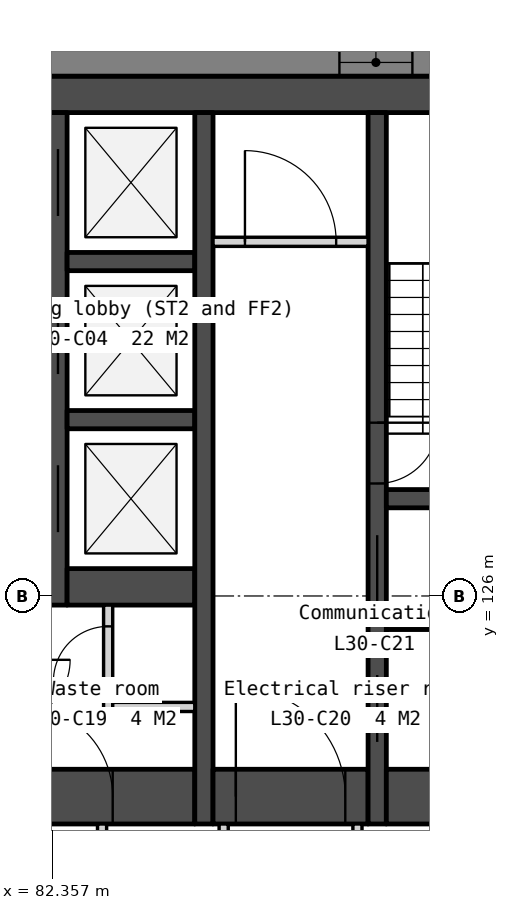
"""IFC4 building model, lengths in metres.
Left out: names, types, materials, properties, quantities, classifications, styles, units other than length and angle.
Written with IfcOpenShell. Run it as: python <this file> out.ifc"""

import sys

from ifc_helpers import new_model, si_unit, direction, frame, frame_2d, origin, place, context, subcontext, project, spatial, polyline, rectangle, outline, extrude, element, fill, save


model = new_model("IFC4")
c1 = context("Model", 3, precision=1e-05, world=origin(), true_north=direction((0.0, 1.0)))
c2 = subcontext(c1, "Body", "Model", "MODEL_VIEW")
j1 = project(units=[si_unit("LENGTHUNIT", "METRE"), si_unit("PLANEANGLEUNIT", "RADIAN")], contexts=[c1])
p1 = place(None, origin())
s1 = spatial("IfcSite", under=j1, at=p1, CompositionType="ELEMENT")
p2 = place(p1, origin())
s2 = spatial("IfcBuilding", under=s1, at=p2, CompositionType="ELEMENT")
p3 = place(p2, frame((0.0, 0.0, 120.3)))
s3 = spatial("IfcBuildingStorey", under=s2, at=p3, CompositionType="ELEMENT", Elevation=120.3)
p4 = place(p3, frame((66.0, 134.25, 0.0), z_axis=(0.0, 0.0, 1.0), x_axis=(1.0, 0.0, 0.0)))
e1 = element("IfcWall", 1, at=p4, inside=s3, PredefinedType="SOLIDWALL", context=c2, shape_type="SweptSolid", body=[
    extrude(rectangle(XDim=28.0, YDim=0.6, at=frame_2d((14.0, 0.0))), origin(), (0.0, 0.0, 1.0), 3.25),
])
p5 = place(p3, frame((81.8, 122.7, 0.0), z_axis=(0.0, 0.0, 1.0), x_axis=(1.0, 0.0, 0.0)))
e2 = element("IfcWall", 2, at=p5, inside=s3, PredefinedType="SOLIDWALL", context=c2, shape_type="SweptSolid", body=[
    extrude(rectangle(XDim=2.9, YDim=0.9, at=frame_2d((1.45, 0.0))), origin(), (0.0, 0.0, 1.0), 3.25),
])
p6 = place(p5, frame((0.05, 0.0, 0.0)))
e3 = element("IfcOpeningElement", 3, at=p6, cuts=e2, PredefinedType="OPENING", context=c2, shape_type="SweptSolid", body=[
    extrude(rectangle(XDim=1.5, YDim=2.1, at=frame_2d((0.75, 1.05))), frame((0.0, 0.46, 0.0), z_axis=(0.0, -1.0, 0.0), x_axis=(1.0, 0.0, 0.0)), (0.0, 0.0, 1.0), 0.92),
])
p7 = place(p3, frame((82.45, 133.95, 0.0), z_axis=(0.0, 0.0, 1.0), x_axis=(0.0, -1.0, 0.0)))
e4 = element("IfcWall", 4, at=p7, inside=s3, PredefinedType="SOLIDWALL", context=c2, shape_type="SweptSolid", body=[
    extrude(rectangle(XDim=8.1, YDim=0.3, at=frame_2d((4.05, 0.0))), origin(), (0.0, 0.0, 1.0), 3.25),
])
p8 = place(p7, frame((0.6, 0.0, 0.0)))
e5 = element("IfcOpeningElement", 5, at=p8, cuts=e4, PredefinedType="OPENING", context=c2, shape_type="SweptSolid", body=[
    extrude(rectangle(XDim=1.1, YDim=2.1, at=frame_2d((0.55, 1.05))), frame((0.0, 0.16, 0.0), z_axis=(0.0, -1.0, 0.0), x_axis=(1.0, 0.0, 0.0)), (0.0, 0.0, 1.0), 0.32),
])
p9 = place(p7, frame((3.2, 0.0, 0.0)))
e6 = element("IfcOpeningElement", 6, at=p9, cuts=e4, PredefinedType="OPENING", context=c2, shape_type="SweptSolid", body=[
    extrude(rectangle(XDim=1.1, YDim=2.1, at=frame_2d((0.55, 1.05))), frame((0.0, 0.16, 0.0), z_axis=(0.0, -1.0, 0.0), x_axis=(1.0, 0.0, 0.0)), (0.0, 0.0, 1.0), 0.32),
])
p10 = place(p7, frame((5.8, 0.0, 0.0)))
e7 = element("IfcOpeningElement", 7, at=p10, cuts=e4, PredefinedType="OPENING", context=c2, shape_type="SweptSolid", body=[
    extrude(rectangle(XDim=1.1, YDim=2.1, at=frame_2d((0.55, 1.05))), frame((0.0, 0.16, 0.0), z_axis=(0.0, -1.0, 0.0), x_axis=(1.0, 0.0, 0.0)), (0.0, 0.0, 1.0), 0.32),
])
for number, where, z_axis, x_axis in (
    (8, (82.6, 131.5, 0.0), (0.0, 0.0, 1.0), (1.0, 0.0, 0.0)),
    (9, (82.6, 128.9, 0.0), (0.0, 0.0, 1.0), (1.0, 0.0, 0.0)),
):
    element("IfcWall", number, at=place(p3, frame(where, z_axis=z_axis, x_axis=x_axis)), inside=s3, PredefinedType="SOLIDWALL", context=c2, shape_type="SweptSolid", body=[
        extrude(rectangle(XDim=2.1, YDim=0.3, at=frame_2d((1.05, 0.0))), origin(), (0.0, 0.0, 1.0), 3.25),
    ])
p11 = place(p3, frame((82.6, 126.15, 0.0), z_axis=(0.0, 0.0, 1.0), x_axis=(1.0, 0.0, 0.0)))
e10 = element("IfcWall", 10, at=p11, inside=s3, PredefinedType="SOLIDWALL", context=c2, shape_type="SweptSolid", body=[
    extrude(rectangle(XDim=2.1, YDim=0.6, at=frame_2d((1.05, 0.0))), origin(), (0.0, 0.0, 1.0), 3.25),
])
p12 = place(p3, frame((83.175, 122.25, 0.0), z_axis=(0.0, 0.0, 1.0), x_axis=(0.0, -1.0, 0.0)))
e11 = element("IfcWall", 11, at=p12, inside=s3, PredefinedType="PARTITIONING", context=c2, shape_type="SweptSolid", body=[
    extrude(rectangle(XDim=2.1, YDim=0.15, at=frame_2d((1.05, 0.0))), origin(), (0.0, 0.0, 1.0), 3.25),
])
p13 = place(p3, frame((83.275, 125.85, 0.0), z_axis=(0.0, 0.0, 1.0), x_axis=(0.0, -1.0, 0.0)))
e12 = element("IfcWall", 12, at=p13, inside=s3, PredefinedType="PARTITIONING", context=c2, shape_type="SweptSolid", body=[
    extrude(rectangle(XDim=1.75, YDim=0.15, at=frame_2d((0.875, 0.0))), origin(), (0.0, 0.0, 1.0), 3.25),
])
p14 = place(p13, frame((0.35, 0.0, 0.0)))
e13 = element("IfcOpeningElement", 13, at=p14, cuts=e12, PredefinedType="OPENING", context=c2, shape_type="SweptSolid", body=[
    extrude(rectangle(XDim=0.9, YDim=2.1, at=frame_2d((0.45, 1.05))), frame((0.0, 0.085, 0.0), z_axis=(0.0, -1.0, 0.0), x_axis=(1.0, 0.0, 0.0)), (0.0, 0.0, 1.0), 0.17),
])
p15 = place(p3, frame((83.35, 124.175, 0.0), z_axis=(0.0, 0.0, 1.0), x_axis=(1.0, 0.0, 0.0)))
e14 = element("IfcWall", 14, at=p15, inside=s3, PredefinedType="PARTITIONING", context=c2, shape_type="SweptSolid", body=[
    extrude(rectangle(XDim=1.35, YDim=0.15, at=frame_2d((0.675, 0.0))), origin(), (0.0, 0.0, 1.0), 3.25),
])
p16 = place(p3, frame((84.85, 133.95, 0.0), z_axis=(0.0, 0.0, 1.0), x_axis=(0.0, -1.0, 0.0)))
e15 = element("IfcWall", 15, at=p16, inside=s3, PredefinedType="SOLIDWALL", context=c2, shape_type="SweptSolid", body=[
    extrude(rectangle(XDim=11.7, YDim=0.3, at=frame_2d((5.85, 0.0))), origin(), (0.0, 0.0, 1.0), 3.25),
])
p17 = place(p3, frame((85.0, 131.825, 0.0), z_axis=(0.0, 0.0, 1.0), x_axis=(1.0, 0.0, 0.0)))
e16 = element("IfcWall", 16, at=p17, inside=s3, PredefinedType="PARTITIONING", context=c2, shape_type="SweptSolid", body=[
    extrude(rectangle(XDim=2.55, YDim=0.15, at=frame_2d((1.275, 0.0))), origin(), (0.0, 0.0, 1.0), 3.25),
])
p18 = place(p17, frame((0.525, 0.0, 0.0)))
e17 = element("IfcOpeningElement", 17, at=p18, cuts=e16, PredefinedType="OPENING", context=c2, shape_type="SweptSolid", body=[
    extrude(rectangle(XDim=1.5, YDim=2.1, at=frame_2d((0.75, 1.05))), frame((0.0, 0.085, 0.0), z_axis=(0.0, -1.0, 0.0), x_axis=(1.0, 0.0, 0.0)), (0.0, 0.0, 1.0), 0.17),
])
p19 = place(p3, frame((85.0, 122.7, 0.0), z_axis=(0.0, 0.0, 1.0), x_axis=(1.0, 0.0, 0.0)))
e18 = element("IfcWall", 18, at=p19, inside=s3, PredefinedType="SOLIDWALL", context=c2, shape_type="SweptSolid", body=[
    extrude(rectangle(XDim=2.55, YDim=0.9, at=frame_2d((1.275, 0.0))), origin(), (0.0, 0.0, 1.0), 3.25),
])
p20 = place(p19, frame((0.375, 0.0, 0.0)))
e19 = element("IfcOpeningElement", 19, at=p20, cuts=e18, PredefinedType="OPENING", context=c2, shape_type="SweptSolid", body=[
    extrude(rectangle(XDim=1.8, YDim=2.1, at=frame_2d((0.9, 1.05))), frame((0.0, 0.46, 0.0), z_axis=(0.0, -1.0, 0.0), x_axis=(1.0, 0.0, 0.0)), (0.0, 0.0, 1.0), 0.92),
])
p21 = place(p3, frame((85.175, 122.25, 0.0), z_axis=(0.0, 0.0, 1.0), x_axis=(0.0, -1.0, 0.0)))
e20 = element("IfcWall", 20, at=p21, inside=s3, PredefinedType="PARTITIONING", context=c2, shape_type="SweptSolid", body=[
    extrude(rectangle(XDim=2.1, YDim=0.15, at=frame_2d((1.05, 0.0))), origin(), (0.0, 0.0, 1.0), 3.25),
])
p22 = place(p21, frame((0.55, 0.0, 0.0)))
e21 = element("IfcOpeningElement", 21, at=p22, cuts=e20, PredefinedType="OPENING", context=c2, shape_type="SweptSolid", body=[
    extrude(rectangle(XDim=1.0, YDim=2.1, at=frame_2d((0.5, 1.05))), frame((0.0, 0.085, 0.0), z_axis=(0.0, -1.0, 0.0), x_axis=(1.0, 0.0, 0.0)), (0.0, 0.0, 1.0), 0.17),
])
p23 = place(p3, frame((87.375, 122.25, 0.0), z_axis=(0.0, 0.0, 1.0), x_axis=(0.0, -1.0, 0.0)))
e22 = element("IfcWall", 22, at=p23, inside=s3, PredefinedType="PARTITIONING", context=c2, shape_type="SweptSolid", body=[
    extrude(rectangle(XDim=2.1, YDim=0.15, at=frame_2d((1.05, 0.0))), origin(), (0.0, 0.0, 1.0), 3.25),
])
p24 = place(p3, frame((87.7, 133.95, 0.0), z_axis=(0.0, 0.0, 1.0), x_axis=(0.0, -1.0, 0.0)))
e23 = element("IfcWall", 23, at=p24, inside=s3, PredefinedType="SOLIDWALL", context=c2, shape_type="SweptSolid", body=[
    extrude(rectangle(XDim=11.7, YDim=0.3, at=frame_2d((5.85, 0.0))), origin(), (0.0, 0.0, 1.0), 3.25),
])
p25 = place(p24, frame((6.95, 0.0, 0.0)))
e24 = element("IfcOpeningElement", 24, at=p25, cuts=e23, PredefinedType="OPENING", context=c2, shape_type="SweptSolid", body=[
    extrude(rectangle(XDim=1.1, YDim=2.1, at=frame_2d((0.55, 1.05))), frame((0.0, 0.16, 0.0), z_axis=(0.0, -1.0, 0.0), x_axis=(1.0, 0.0, 0.0)), (0.0, 0.0, 1.0), 0.32),
])
p26 = place(p24, frame((5.1, 0.0, 0.0)))
e25 = element("IfcOpeningElement", 25, at=p26, cuts=e23, PredefinedType="OPENING", context=c2, shape_type="SweptSolid", body=[
    extrude(rectangle(XDim=1.0, YDim=2.1, at=frame_2d((0.5, 1.05))), frame((0.0, 0.16, 0.0), z_axis=(0.0, -1.0, 0.0), x_axis=(1.0, 0.0, 0.0)), (0.0, 0.0, 1.0), 0.32),
])
p27 = place(p24, frame((9.25, 0.0, 0.0)))
e26 = element("IfcOpeningElement", 26, at=p27, cuts=e23, PredefinedType="OPENING", context=c2, shape_type="SweptSolid", body=[
    extrude(rectangle(XDim=1.1, YDim=2.1, at=frame_2d((0.55, 1.05))), frame((0.0, 0.16, 0.0), z_axis=(0.0, -1.0, 0.0), x_axis=(1.0, 0.0, 0.0)), (0.0, 0.0, 1.0), 0.32),
])
for number, where, z_axis, x_axis in (
    (27, (87.85, 127.6, 0.0), (0.0, 0.0, 1.0), (1.0, 0.0, 0.0)),
    (28, (87.85, 125.3, 0.0), (0.0, 0.0, 1.0), (1.0, 0.0, 0.0)),
):
    element("IfcWall", number, at=place(p3, frame(where, z_axis=z_axis, x_axis=x_axis)), inside=s3, PredefinedType="SOLIDWALL", context=c2, shape_type="SweptSolid", body=[
        extrude(rectangle(XDim=2.55, YDim=0.3, at=frame_2d((1.275, 0.0))), origin(), (0.0, 0.0, 1.0), 3.25),
    ])
p28 = place(p3, frame((87.85, 122.7, 0.0), z_axis=(0.0, 0.0, 1.0), x_axis=(1.0, 0.0, 0.0)))
e29 = element("IfcWall", 29, at=p28, inside=s3, PredefinedType="SOLIDWALL", context=c2, shape_type="SweptSolid", body=[
    extrude(rectangle(XDim=2.55, YDim=0.9, at=frame_2d((1.275, 0.0))), origin(), (0.0, 0.0, 1.0), 3.25),
])
p29 = place(p3, frame((101.322, 134.775, -0.15), z_axis=(0.0, 0.0, 1.0), x_axis=(-1.0, 0.0, 0.0)))
e30 = element("IfcWall", 30, at=p29, inside=s3, PredefinedType="SOLIDWALL", context=c2, shape_type="SweptSolid", body=[
    extrude(outline(polyline([(42.643, 0.0), (42.643, 3.4), (0.0, 3.4), (0.0, 0.0), (42.643, 0.0)])), frame((0.0, 0.225, 0.0), z_axis=(0.0, -1.0, 0.0), x_axis=(1.0, 0.0, 0.0)), (0.0, 0.0, 1.0), 0.45),
])
p30 = place(p29, frame((2.814, 0.0, 1.05)))
e31 = element("IfcOpeningElement", 31, at=p30, cuts=e30, PredefinedType="OPENING", context=c2, shape_type="SweptSolid", body=[
    extrude(rectangle(XDim=1.2, YDim=1.5, at=frame_2d((0.6, 0.75))), frame((0.0, 0.235, 0.0), z_axis=(0.0, -1.0, 0.0), x_axis=(1.0, 0.0, 0.0)), (0.0, 0.0, 1.0), 0.47),
])
p31 = place(p29, frame((4.514, 0.0, 1.05)))
e32 = element("IfcOpeningElement", 32, at=p31, cuts=e30, PredefinedType="OPENING", context=c2, shape_type="SweptSolid", body=[
    extrude(rectangle(XDim=1.2, YDim=1.5, at=frame_2d((0.6, 0.75))), frame((0.0, 0.235, 0.0), z_axis=(0.0, -1.0, 0.0), x_axis=(1.0, 0.0, 0.0)), (0.0, 0.0, 1.0), 0.47),
])
p32 = place(p29, frame((11.343, 0.0, 1.05)))
e33 = element("IfcOpeningElement", 33, at=p32, cuts=e30, PredefinedType="OPENING", context=c2, shape_type="SweptSolid", body=[
    extrude(rectangle(XDim=1.2, YDim=1.5, at=frame_2d((0.6, 0.75))), frame((0.0, 0.235, 0.0), z_axis=(0.0, -1.0, 0.0), x_axis=(1.0, 0.0, 0.0)), (0.0, 0.0, 1.0), 0.47),
])
p33 = place(p29, frame((13.043, 0.0, 1.05)))
e34 = element("IfcOpeningElement", 34, at=p33, cuts=e30, PredefinedType="OPENING", context=c2, shape_type="SweptSolid", body=[
    extrude(rectangle(XDim=1.2, YDim=1.5, at=frame_2d((0.6, 0.75))), frame((0.0, 0.235, 0.0), z_axis=(0.0, -1.0, 0.0), x_axis=(1.0, 0.0, 0.0)), (0.0, 0.0, 1.0), 0.47),
])
p34 = place(p29, frame((19.872, 0.0, 1.05)))
e35 = element("IfcOpeningElement", 35, at=p34, cuts=e30, PredefinedType="OPENING", context=c2, shape_type="SweptSolid", body=[
    extrude(rectangle(XDim=1.2, YDim=1.5, at=frame_2d((0.6, 0.75))), frame((0.0, 0.235, 0.0), z_axis=(0.0, -1.0, 0.0), x_axis=(1.0, 0.0, 0.0)), (0.0, 0.0, 1.0), 0.47),
])
p35 = place(p29, frame((21.572, 0.0, 1.05)))
e36 = element("IfcOpeningElement", 36, at=p35, cuts=e30, PredefinedType="OPENING", context=c2, shape_type="SweptSolid", body=[
    extrude(rectangle(XDim=1.2, YDim=1.5, at=frame_2d((0.6, 0.75))), frame((0.0, 0.235, 0.0), z_axis=(0.0, -1.0, 0.0), x_axis=(1.0, 0.0, 0.0)), (0.0, 0.0, 1.0), 0.47),
])
p36 = place(p29, frame((28.4, 0.0, 1.05)))
e37 = element("IfcOpeningElement", 37, at=p36, cuts=e30, PredefinedType="OPENING", context=c2, shape_type="SweptSolid", body=[
    extrude(rectangle(XDim=1.2, YDim=1.5, at=frame_2d((0.6, 0.75))), frame((0.0, 0.235, 0.0), z_axis=(0.0, -1.0, 0.0), x_axis=(1.0, 0.0, 0.0)), (0.0, 0.0, 1.0), 0.47),
])
p37 = place(p29, frame((30.1, 0.0, 1.05)))
e38 = element("IfcOpeningElement", 38, at=p37, cuts=e30, PredefinedType="OPENING", context=c2, shape_type="SweptSolid", body=[
    extrude(rectangle(XDim=1.2, YDim=1.5, at=frame_2d((0.6, 0.75))), frame((0.0, 0.235, 0.0), z_axis=(0.0, -1.0, 0.0), x_axis=(1.0, 0.0, 0.0)), (0.0, 0.0, 1.0), 0.47),
])
p38 = place(p29, frame((36.929, 0.0, 1.05)))
e39 = element("IfcOpeningElement", 39, at=p38, cuts=e30, PredefinedType="OPENING", context=c2, shape_type="SweptSolid", body=[
    extrude(rectangle(XDim=1.2, YDim=1.5, at=frame_2d((0.6, 0.75))), frame((0.0, 0.235, 0.0), z_axis=(0.0, -1.0, 0.0), x_axis=(1.0, 0.0, 0.0)), (0.0, 0.0, 1.0), 0.47),
])
p39 = place(p29, frame((38.629, 0.0, 1.05)))
e40 = element("IfcOpeningElement", 40, at=p39, cuts=e30, PredefinedType="OPENING", context=c2, shape_type="SweptSolid", body=[
    extrude(rectangle(XDim=1.2, YDim=1.5, at=frame_2d((0.6, 0.75))), frame((0.0, 0.235, 0.0), z_axis=(0.0, -1.0, 0.0), x_axis=(1.0, 0.0, 0.0)), (0.0, 0.0, 1.0), 0.47),
])
p40 = place(p3, frame((82.605, 93.333, -0.15), z_axis=(0.0, 0.0, 1.0), x_axis=(0.500000478905, 0.866025127289, 0.0)))
e41 = element("IfcWall", 41, at=p40, inside=s3, PredefinedType="SOLIDWALL", context=c2, shape_type="SweptSolid", body=[
    extrude(outline(polyline([(42.643, 0.0), (42.643, 3.4), (0.0, 3.4), (0.0, 0.0), (42.643, 0.0)])), frame((0.0, 0.225, 0.0), z_axis=(0.0, -1.0, 0.0), x_axis=(1.0, 0.0, 0.0)), (0.0, 0.0, 1.0), 0.45),
])
p41 = place(p40, frame((2.814, 0.0, 1.05)))
e42 = element("IfcOpeningElement", 42, at=p41, cuts=e41, PredefinedType="OPENING", context=c2, shape_type="SweptSolid", body=[
    extrude(rectangle(XDim=1.2, YDim=1.5, at=frame_2d((0.6, 0.75))), frame((0.0, 0.235, 0.0), z_axis=(0.0, -1.0, 0.0), x_axis=(1.0, 0.0, 0.0)), (0.0, 0.0, 1.0), 0.47),
])
p42 = place(p40, frame((4.514, 0.0, 1.05)))
e43 = element("IfcOpeningElement", 43, at=p42, cuts=e41, PredefinedType="OPENING", context=c2, shape_type="SweptSolid", body=[
    extrude(rectangle(XDim=1.2, YDim=1.5, at=frame_2d((0.6, 0.75))), frame((0.0, 0.235, 0.0), z_axis=(0.0, -1.0, 0.0), x_axis=(1.0, 0.0, 0.0)), (0.0, 0.0, 1.0), 0.47),
])
p43 = place(p40, frame((11.343, 0.0, 1.05)))
e44 = element("IfcOpeningElement", 44, at=p43, cuts=e41, PredefinedType="OPENING", context=c2, shape_type="SweptSolid", body=[
    extrude(rectangle(XDim=1.2, YDim=1.5, at=frame_2d((0.6, 0.75))), frame((0.0, 0.235, 0.0), z_axis=(0.0, -1.0, 0.0), x_axis=(1.0, 0.0, 0.0)), (0.0, 0.0, 1.0), 0.47),
])
p44 = place(p40, frame((13.043, 0.0, 1.05)))
e45 = element("IfcOpeningElement", 45, at=p44, cuts=e41, PredefinedType="OPENING", context=c2, shape_type="SweptSolid", body=[
    extrude(rectangle(XDim=1.2, YDim=1.5, at=frame_2d((0.6, 0.75))), frame((0.0, 0.235, 0.0), z_axis=(0.0, -1.0, 0.0), x_axis=(1.0, 0.0, 0.0)), (0.0, 0.0, 1.0), 0.47),
])
p45 = place(p40, frame((19.872, 0.0, 1.05)))
e46 = element("IfcOpeningElement", 46, at=p45, cuts=e41, PredefinedType="OPENING", context=c2, shape_type="SweptSolid", body=[
    extrude(rectangle(XDim=1.2, YDim=1.5, at=frame_2d((0.6, 0.75))), frame((0.0, 0.235, 0.0), z_axis=(0.0, -1.0, 0.0), x_axis=(1.0, 0.0, 0.0)), (0.0, 0.0, 1.0), 0.47),
])
p46 = place(p40, frame((21.572, 0.0, 1.05)))
e47 = element("IfcOpeningElement", 47, at=p46, cuts=e41, PredefinedType="OPENING", context=c2, shape_type="SweptSolid", body=[
    extrude(rectangle(XDim=1.2, YDim=1.5, at=frame_2d((0.6, 0.75))), frame((0.0, 0.235, 0.0), z_axis=(0.0, -1.0, 0.0), x_axis=(1.0, 0.0, 0.0)), (0.0, 0.0, 1.0), 0.47),
])
p47 = place(p40, frame((28.4, 0.0, 1.05)))
e48 = element("IfcOpeningElement", 48, at=p47, cuts=e41, PredefinedType="OPENING", context=c2, shape_type="SweptSolid", body=[
    extrude(rectangle(XDim=1.2, YDim=1.5, at=frame_2d((0.6, 0.75))), frame((0.0, 0.235, 0.0), z_axis=(0.0, -1.0, 0.0), x_axis=(1.0, 0.0, 0.0)), (0.0, 0.0, 1.0), 0.47),
])
p48 = place(p40, frame((30.1, 0.0, 1.05)))
e49 = element("IfcOpeningElement", 49, at=p48, cuts=e41, PredefinedType="OPENING", context=c2, shape_type="SweptSolid", body=[
    extrude(rectangle(XDim=1.2, YDim=1.5, at=frame_2d((0.6, 0.75))), frame((0.0, 0.235, 0.0), z_axis=(0.0, -1.0, 0.0), x_axis=(1.0, 0.0, 0.0)), (0.0, 0.0, 1.0), 0.47),
])
p49 = place(p40, frame((36.929, 0.0, 1.05)))
e50 = element("IfcOpeningElement", 50, at=p49, cuts=e41, PredefinedType="OPENING", context=c2, shape_type="SweptSolid", body=[
    extrude(rectangle(XDim=1.2, YDim=1.5, at=frame_2d((0.6, 0.75))), frame((0.0, 0.235, 0.0), z_axis=(0.0, -1.0, 0.0), x_axis=(1.0, 0.0, 0.0)), (0.0, 0.0, 1.0), 0.47),
])
p50 = place(p40, frame((38.629, 0.0, 1.05)))
e51 = element("IfcOpeningElement", 51, at=p50, cuts=e41, PredefinedType="OPENING", context=c2, shape_type="SweptSolid", body=[
    extrude(rectangle(XDim=1.2, YDim=1.5, at=frame_2d((0.6, 0.75))), frame((0.0, 0.235, 0.0), z_axis=(0.0, -1.0, 0.0), x_axis=(1.0, 0.0, 0.0)), (0.0, 0.0, 1.0), 0.47),
])
p51 = place(p8, origin())
e52 = element("IfcDoor", 52, at=p51, inside=s3, OperationType="SLIDING_TO_LEFT", PredefinedType="DOOR", context=c2, shape_type="SweptSolid", body=[
    extrude(rectangle(XDim=1.1, YDim=2.1, at=frame_2d((0.55, 1.05))), frame((0.0, 0.025, 0.0), z_axis=(0.0, -1.0, 0.0), x_axis=(1.0, 0.0, 0.0)), (0.0, 0.0, 1.0), 0.05),
])
fill(e5, e52)
p52 = place(p9, origin())
e53 = element("IfcDoor", 53, at=p52, inside=s3, OperationType="SLIDING_TO_LEFT", PredefinedType="DOOR", context=c2, shape_type="SweptSolid", body=[
    extrude(rectangle(XDim=1.1, YDim=2.1, at=frame_2d((0.55, 1.05))), frame((0.0, 0.025, 0.0), z_axis=(0.0, -1.0, 0.0), x_axis=(1.0, 0.0, 0.0)), (0.0, 0.0, 1.0), 0.05),
])
fill(e6, e53)
p53 = place(p10, origin())
e54 = element("IfcDoor", 54, at=p53, inside=s3, OperationType="SLIDING_TO_LEFT", PredefinedType="DOOR", context=c2, shape_type="SweptSolid", body=[
    extrude(rectangle(XDim=1.1, YDim=2.1, at=frame_2d((0.55, 1.05))), frame((0.0, 0.025, 0.0), z_axis=(0.0, -1.0, 0.0), x_axis=(1.0, 0.0, 0.0)), (0.0, 0.0, 1.0), 0.05),
])
fill(e7, e54)
p54 = place(p25, origin())
e55 = element("IfcDoor", 55, at=p54, inside=s3, OperationType="SLIDING_TO_LEFT", PredefinedType="DOOR", context=c2, shape_type="SweptSolid", body=[
    extrude(rectangle(XDim=1.1, YDim=2.1, at=frame_2d((0.55, 1.05))), frame((0.0, 0.025, 0.0), z_axis=(0.0, -1.0, 0.0), x_axis=(1.0, 0.0, 0.0)), (0.0, 0.0, 1.0), 0.05),
])
fill(e24, e55)
p55 = place(p20, origin())
e56 = element("IfcDoor", 56, at=p55, inside=s3, OperationType="DOUBLE_DOOR_DOUBLE_SWING", PredefinedType="DOOR", context=c2, shape_type="SweptSolid", body=[
    extrude(rectangle(XDim=1.8, YDim=2.1, at=frame_2d((0.9, 1.05))), frame((0.0, 0.025, 0.0), z_axis=(0.0, -1.0, 0.0), x_axis=(1.0, 0.0, 0.0)), (0.0, 0.0, 1.0), 0.05),
])
fill(e19, e56)
p56 = place(p6, origin())
e57 = element("IfcDoor", 57, at=p56, inside=s3, OperationType="DOUBLE_DOOR_DOUBLE_SWING", PredefinedType="DOOR", context=c2, shape_type="SweptSolid", body=[
    extrude(rectangle(XDim=1.5, YDim=2.1, at=frame_2d((0.75, 1.05))), frame((0.0, 0.025, 0.0), z_axis=(0.0, -1.0, 0.0), x_axis=(1.0, 0.0, 0.0)), (0.0, 0.0, 1.0), 0.05),
])
fill(e3, e57)
p57 = place(p14, origin())
e58 = element("IfcDoor", 58, at=p57, inside=s3, OperationType="SINGLE_SWING_RIGHT", PredefinedType="DOOR", context=c2, shape_type="SweptSolid", body=[
    extrude(rectangle(XDim=0.9, YDim=2.1, at=frame_2d((0.45, 1.05))), frame((0.0, 0.025, 0.0), z_axis=(0.0, -1.0, 0.0), x_axis=(1.0, 0.0, 0.0)), (0.0, 0.0, 1.0), 0.05),
])
fill(e13, e58)
p58 = place(p18, origin())
e59 = element("IfcDoor", 59, at=p58, inside=s3, OperationType="DOUBLE_DOOR_DOUBLE_SWING", PredefinedType="DOOR", context=c2, shape_type="SweptSolid", body=[
    extrude(rectangle(XDim=1.5, YDim=2.1, at=frame_2d((0.75, 1.05))), frame((0.0, 0.025, 0.0), z_axis=(0.0, -1.0, 0.0), x_axis=(1.0, 0.0, 0.0)), (0.0, 0.0, 1.0), 0.05),
])
fill(e17, e59)
p59 = place(p26, origin())
e60 = element("IfcDoor", 60, at=p59, inside=s3, OperationType="SINGLE_SWING_LEFT", PredefinedType="DOOR", context=c2, shape_type="SweptSolid", body=[
    extrude(rectangle(XDim=1.0, YDim=2.1, at=frame_2d((0.5, 1.05))), frame((0.0, 0.025, 0.0), z_axis=(0.0, -1.0, 0.0), x_axis=(1.0, 0.0, 0.0)), (0.0, 0.0, 1.0), 0.05),
])
fill(e25, e60)
p60 = place(p27, origin())
e61 = element("IfcDoor", 61, at=p60, inside=s3, OperationType="SLIDING_TO_LEFT", PredefinedType="DOOR", context=c2, shape_type="SweptSolid", body=[
    extrude(rectangle(XDim=1.1, YDim=2.1, at=frame_2d((0.55, 1.05))), frame((0.0, 0.025, 0.0), z_axis=(0.0, -1.0, 0.0), x_axis=(1.0, 0.0, 0.0)), (0.0, 0.0, 1.0), 0.05),
])
fill(e26, e61)
p61 = place(p33, origin())
e62 = element("IfcWindow", 62, at=p61, inside=s3, PartitioningType="SINGLE_PANEL", PredefinedType="WINDOW", context=c2, shape_type="SweptSolid", body=[
    extrude(rectangle(XDim=1.2, YDim=1.5, at=frame_2d((0.6, 0.75))), frame((0.0, 0.03, 0.0), z_axis=(0.0, -1.0, 0.0), x_axis=(1.0, 0.0, 0.0)), (0.0, 0.0, 1.0), 0.06),
])
fill(e34, e62)
save(model, sys.argv[1])
